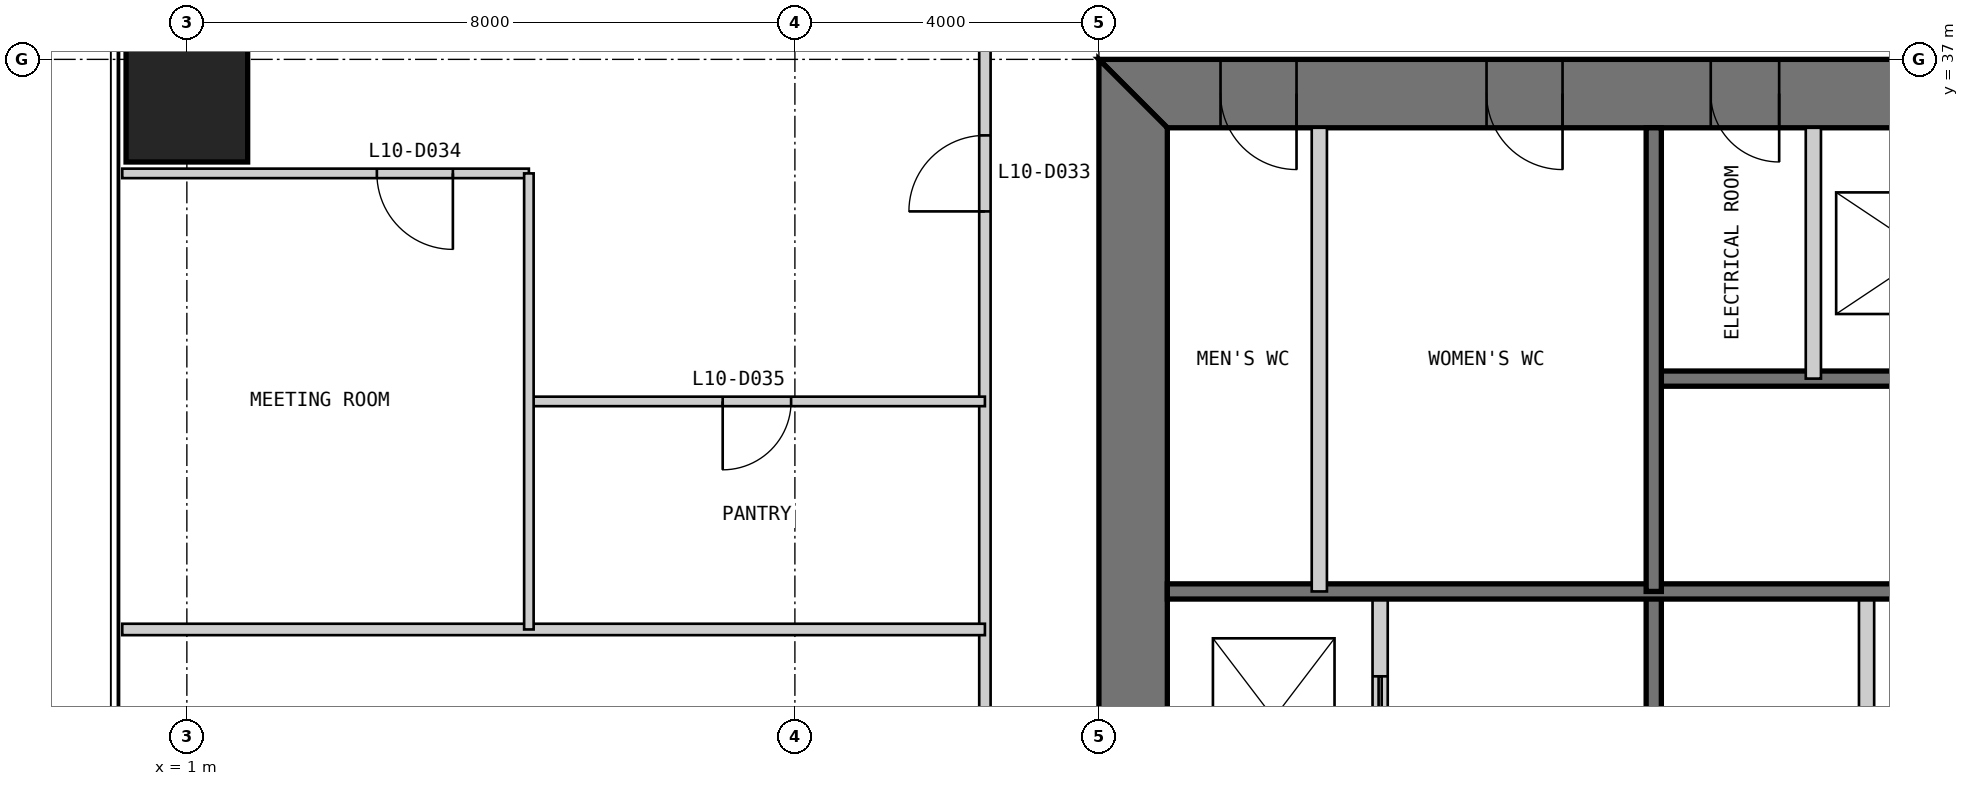
"""IFC4 building model, lengths in metres.
Left out: names, types, materials, properties, quantities, classifications, styles, units other than length and angle.
Written with IfcOpenShell. Run it as: python <this file> out.ifc"""

import sys

from ifc_helpers import new_model, si_unit, direction, frame, frame_2d, origin, origin_2d, place, context, subcontext, project, spatial, polyline, rectangle, outline, extrude, element, fill, save


model = new_model("IFC4")
c1 = context("Model", 3, precision=1e-05, world=origin(), true_north=direction((0.0, 1.0)))
c2 = subcontext(c1, "Body", "Model", "MODEL_VIEW")
j1 = project(units=[si_unit("LENGTHUNIT", "METRE"), si_unit("PLANEANGLEUNIT", "RADIAN")], contexts=[c1])
p1 = place(None, origin())
s1 = spatial("IfcSite", under=j1, at=p1, CompositionType="ELEMENT")
p2 = place(p1, origin())
s2 = spatial("IfcBuilding", under=s1, at=p2, CompositionType="ELEMENT")
p3 = place(p2, frame((0.0, 0.0, 47.0)))
s3 = spatial("IfcBuildingStorey", under=s2, at=p3, CompositionType="ELEMENT", Elevation=47.0)
p4 = place(p3, frame((1.0, 37.0, 0.0), z_axis=(0.0, 0.0, 1.0), x_axis=(1.0, 0.0, 0.0)))
e1 = element("IfcColumn", 1, at=p4, inside=s3, PredefinedType="COLUMN", context=c2, shape_type="SweptSolid", body=[
    extrude(rectangle(XDim=1.6, YDim=2.7, at=origin_2d()), origin(), (0.0, 0.0, 1.0), 4.0),
])
p5 = place(p3, frame((37.0, 36.55, 0.0), z_axis=(0.0, 0.0, 1.0), x_axis=(-1.0, 0.0, 0.0)))
e2 = element("IfcWall", 2, at=p5, inside=s3, PredefinedType="SHEAR", context=c2, shape_type="SweptSolid", body=[
    extrude(outline(polyline([(0.0, -0.45), (24.0, -0.45), (23.1, 0.45), (0.9, 0.45), (0.0, -0.45)])), origin(), (0.0, 0.0, 1.0), 4.0),
])
p6 = place(p5, frame((4.9, 0.0, 0.0)))
e3 = element("IfcOpeningElement", 3, at=p6, cuts=e2, PredefinedType="OPENING", context=c2, shape_type="SweptSolid", body=[
    extrude(rectangle(XDim=1.0, YDim=2.2, at=frame_2d((0.5, 1.1))), frame((0.0, 0.46, 0.0), z_axis=(0.0, -1.0, 0.0), x_axis=(1.0, 0.0, 0.0)), (0.0, 0.0, 1.0), 0.92),
])
p7 = place(p5, frame((8.9, 0.0, 0.0)))
e4 = element("IfcOpeningElement", 4, at=p7, cuts=e2, PredefinedType="OPENING", context=c2, shape_type="SweptSolid", body=[
    extrude(rectangle(XDim=1.1, YDim=2.2, at=frame_2d((0.55, 1.1))), frame((0.0, 0.46, 0.0), z_axis=(0.0, -1.0, 0.0), x_axis=(1.0, 0.0, 0.0)), (0.0, 0.0, 1.0), 0.92),
])
p8 = place(p5, frame((15.05, 0.0, 0.0)))
e5 = element("IfcOpeningElement", 5, at=p8, cuts=e2, PredefinedType="OPENING", context=c2, shape_type="SweptSolid", body=[
    extrude(rectangle(XDim=0.9, YDim=2.2, at=frame_2d((0.45, 1.1))), frame((0.0, 0.46, 0.0), z_axis=(0.0, -1.0, 0.0), x_axis=(1.0, 0.0, 0.0)), (0.0, 0.0, 1.0), 0.92),
])
p9 = place(p5, frame((17.9, 0.0, 0.0)))
e6 = element("IfcOpeningElement", 6, at=p9, cuts=e2, PredefinedType="OPENING", context=c2, shape_type="SweptSolid", body=[
    extrude(rectangle(XDim=1.0, YDim=2.2, at=frame_2d((0.5, 1.1))), frame((0.0, 0.46, 0.0), z_axis=(0.0, -1.0, 0.0), x_axis=(1.0, 0.0, 0.0)), (0.0, 0.0, 1.0), 0.92),
])
p10 = place(p5, frame((21.4, 0.0, 0.0)))
e7 = element("IfcOpeningElement", 7, at=p10, cuts=e2, PredefinedType="OPENING", context=c2, shape_type="SweptSolid", body=[
    extrude(rectangle(XDim=1.0, YDim=2.2, at=frame_2d((0.5, 1.1))), frame((0.0, 0.46, 0.0), z_axis=(0.0, -1.0, 0.0), x_axis=(1.0, 0.0, 0.0)), (0.0, 0.0, 1.0), 0.92),
])
p11 = place(p3, frame((13.45, 36.1, 0.0), z_axis=(0.0, 0.0, 1.0), x_axis=(0.0, -1.0, 0.0)))
e8 = element("IfcWall", 8, at=p11, inside=s3, PredefinedType="SHEAR", context=c2, shape_type="SweptSolid", body=[
    extrude(outline(polyline([(-0.9, -0.45), (23.1, -0.45), (22.2, 0.45), (0.0, 0.45), (-0.9, -0.45)])), origin(), (0.0, 0.0, 1.0), 4.0),
])
p12 = place(p11, frame((20.2, 0.0, 0.0)))
e9 = element("IfcOpeningElement", 9, at=p12, cuts=e8, PredefinedType="OPENING", context=c2, shape_type="SweptSolid", body=[
    extrude(rectangle(XDim=1.0, YDim=2.2, at=frame_2d((0.5, 1.1))), frame((0.0, 0.46, 0.0), z_axis=(0.0, -1.0, 0.0), x_axis=(1.0, 0.0, 0.0)), (0.0, 0.0, 1.0), 0.92),
])
p13 = place(p11, frame((17.25, 0.0, 0.0)))
e10 = element("IfcOpeningElement", 10, at=p13, cuts=e8, PredefinedType="OPENING", context=c2, shape_type="SweptSolid", body=[
    extrude(rectangle(XDim=0.9, YDim=2.2, at=frame_2d((0.45, 1.1))), frame((0.0, 0.46, 0.0), z_axis=(0.0, -1.0, 0.0), x_axis=(1.0, 0.0, 0.0)), (0.0, 0.0, 1.0), 0.92),
])
p14 = place(p3, frame((16.7, 13.9, 0.0), z_axis=(0.0, 0.0, 1.0), x_axis=(0.0, 1.0, 0.0)))
e11 = element("IfcWall", 11, at=p14, inside=s3, PredefinedType="PARTITIONING", context=c2, shape_type="SweptSolid", body=[
    extrude(rectangle(XDim=16.1, YDim=0.2, at=frame_2d((8.05, 0.0))), origin(), (0.0, 0.0, 1.0), 3.8),
])
p15 = place(p14, frame((4.4, 0.0, 0.0)))
e12 = element("IfcOpeningElement", 12, at=p15, cuts=e11, PredefinedType="OPENING", context=c2, shape_type="SweptSolid", body=[
    extrude(rectangle(XDim=0.9, YDim=2.2, at=frame_2d((0.45, 1.1))), frame((0.0, 0.11, 0.0), z_axis=(0.0, -1.0, 0.0), x_axis=(1.0, 0.0, 0.0)), (0.0, 0.0, 1.0), 0.22),
])
p16 = place(p14, frame((7.217, 0.0, 0.0)))
e13 = element("IfcOpeningElement", 13, at=p16, cuts=e11, PredefinedType="OPENING", context=c2, shape_type="SweptSolid", body=[
    extrude(rectangle(XDim=1.1, YDim=2.2, at=frame_2d((0.55, 1.1))), frame((0.0, 0.11, 0.0), z_axis=(0.0, -1.0, 0.0), x_axis=(1.0, 0.0, 0.0)), (0.0, 0.0, 1.0), 0.22),
])
p17 = place(p14, frame((10.55, 0.0, 0.0)))
e14 = element("IfcOpeningElement", 14, at=p17, cuts=e11, PredefinedType="OPENING", context=c2, shape_type="SweptSolid", body=[
    extrude(rectangle(XDim=1.1, YDim=2.2, at=frame_2d((0.55, 1.1))), frame((0.0, 0.11, 0.0), z_axis=(0.0, -1.0, 0.0), x_axis=(1.0, 0.0, 0.0)), (0.0, 0.0, 1.0), 0.22),
])
p18 = place(p14, frame((13.883, 0.0, 0.0)))
e15 = element("IfcOpeningElement", 15, at=p18, cuts=e11, PredefinedType="OPENING", context=c2, shape_type="SweptSolid", body=[
    extrude(rectangle(XDim=1.1, YDim=2.2, at=frame_2d((0.55, 1.1))), frame((0.0, 0.11, 0.0), z_axis=(0.0, -1.0, 0.0), x_axis=(1.0, 0.0, 0.0)), (0.0, 0.0, 1.0), 0.22),
])
p19 = place(p3, frame((20.3, 13.9, 0.0), z_axis=(0.0, 0.0, 1.0), x_axis=(0.0, 1.0, 0.0)))
e16 = element("IfcWall", 16, at=p19, inside=s3, PredefinedType="SOLIDWALL", context=c2, shape_type="SweptSolid", body=[
    extrude(rectangle(XDim=16.1, YDim=0.2, at=frame_2d((8.05, 0.0))), origin(), (0.0, 0.0, 1.0), 3.8),
])
p20 = place(p3, frame((23.1, 20.0, 0.0), z_axis=(0.0, 0.0, 1.0), x_axis=(0.0, 1.0, 0.0)))
e17 = element("IfcWall", 17, at=p20, inside=s3, PredefinedType="PARTITIONING", context=c2, shape_type="SweptSolid", body=[
    extrude(rectangle(XDim=10.0, YDim=0.2, at=frame_2d((5.0, 0.0))), origin(), (0.0, 0.0, 1.0), 3.8),
])
p21 = place(p3, frame((29.7, 32.8, 0.0), z_axis=(0.0, 0.0, 1.0), x_axis=(-1.0, 0.0, 0.0)))
e18 = element("IfcWall", 18, at=p21, inside=s3, PredefinedType="SOLIDWALL", context=c2, shape_type="SweptSolid", body=[
    extrude(rectangle(XDim=9.4, YDim=0.2, at=frame_2d((4.7, 0.0))), origin(), (0.0, 0.0, 1.0), 3.8),
])
p22 = place(p21, frame((0.25, 0.0, 0.0)))
e19 = element("IfcOpeningElement", 19, at=p22, cuts=e18, PredefinedType="OPENING", context=c2, shape_type="SweptSolid", body=[
    extrude(rectangle(XDim=1.0, YDim=2.2, at=frame_2d((0.5, 1.1))), frame((0.0, 0.11, 0.0), z_axis=(0.0, -1.0, 0.0), x_axis=(1.0, 0.0, 0.0)), (0.0, 0.0, 1.0), 0.22),
])
p23 = place(p3, frame((29.7, 30.0, 0.0), z_axis=(0.0, 0.0, 1.0), x_axis=(-1.0, 0.0, 0.0)))
e20 = element("IfcWall", 20, at=p23, inside=s3, PredefinedType="SOLIDWALL", context=c2, shape_type="SweptSolid", body=[
    extrude(rectangle(XDim=15.8, YDim=0.2, at=frame_2d((7.9, 0.0))), origin(), (0.0, 0.0, 1.0), 3.8),
])
p24 = place(p3, frame((22.4, 36.1, 0.0), z_axis=(0.0, 0.0, 1.0), x_axis=(0.0, -1.0, 0.0)))
e21 = element("IfcWall", 21, at=p24, inside=s3, PredefinedType="PARTITIONING", context=c2, shape_type="SweptSolid", body=[
    extrude(rectangle(XDim=3.3, YDim=0.2, at=frame_2d((1.65, 0.0))), origin(), (0.0, 0.0, 1.0), 3.8),
])
p25 = place(p3, frame((20.3, 36.1, 0.0), z_axis=(0.0, 0.0, 1.0), x_axis=(0.0, -1.0, 0.0)))
e22 = element("IfcWall", 22, at=p25, inside=s3, PredefinedType="SOLIDWALL", context=c2, shape_type="SweptSolid", body=[
    extrude(rectangle(XDim=6.1, YDim=0.2, at=frame_2d((3.05, 0.0))), origin(), (0.0, 0.0, 1.0), 3.8),
])
p26 = place(p3, frame((15.9, 36.1, 0.0), z_axis=(0.0, 0.0, 1.0), x_axis=(0.0, -1.0, 0.0)))
e23 = element("IfcWall", 23, at=p26, inside=s3, PredefinedType="PARTITIONING", context=c2, shape_type="SweptSolid", body=[
    extrude(rectangle(XDim=6.1, YDim=0.2, at=frame_2d((3.05, 0.0))), origin(), (0.0, 0.0, 1.0), 3.8),
])
p27 = place(p3, frame((11.5, 38.5, 0.0), z_axis=(0.0, 0.0, 1.0), x_axis=(0.0, -1.0, 0.0)))
e24 = element("IfcWall", 24, at=p27, inside=s3, PredefinedType="PARTITIONING", context=c2, shape_type="SweptSolid", body=[
    extrude(rectangle(XDim=27.0, YDim=0.15, at=frame_2d((13.5, 0.0))), origin(), (0.0, 0.0, 1.0), 3.85),
])
p28 = place(p27, frame((2.5, 0.0, 0.0)))
e25 = element("IfcOpeningElement", 25, at=p28, cuts=e24, PredefinedType="OPENING", context=c2, shape_type="SweptSolid", body=[
    extrude(rectangle(XDim=1.0, YDim=2.2, at=frame_2d((0.5, 1.1))), frame((0.0, 0.085, 0.0), z_axis=(0.0, -1.0, 0.0), x_axis=(1.0, 0.0, 0.0)), (0.0, 0.0, 1.0), 0.17),
])
p29 = place(p27, frame((13.0, 0.0, 0.0)))
e26 = element("IfcOpeningElement", 26, at=p29, cuts=e24, PredefinedType="OPENING", context=c2, shape_type="SweptSolid", body=[
    extrude(rectangle(XDim=1.0, YDim=2.2, at=frame_2d((0.5, 1.1))), frame((0.0, 0.085, 0.0), z_axis=(0.0, -1.0, 0.0), x_axis=(1.0, 0.0, 0.0)), (0.0, 0.0, 1.0), 0.17),
])
p30 = place(p27, frame((23.5, 0.0, 0.0)))
e27 = element("IfcOpeningElement", 27, at=p30, cuts=e24, PredefinedType="OPENING", context=c2, shape_type="SweptSolid", body=[
    extrude(rectangle(XDim=1.0, YDim=2.2, at=frame_2d((0.5, 1.1))), frame((0.0, 0.085, 0.0), z_axis=(0.0, -1.0, 0.0), x_axis=(1.0, 0.0, 0.0)), (0.0, 0.0, 1.0), 0.17),
])
p31 = place(p3, frame((0.15, 35.5, 0.0), z_axis=(0.0, 0.0, 1.0), x_axis=(1.0, 0.0, 0.0)))
e28 = element("IfcWall", 28, at=p31, inside=s3, PredefinedType="PARTITIONING", context=c2, shape_type="SweptSolid", body=[
    extrude(rectangle(XDim=5.35, YDim=0.125, at=frame_2d((2.675, 0.0))), origin(), (0.0, 0.0, 1.0), 3.85),
])
p32 = place(p31, frame((3.35, 0.0, 0.0)))
e29 = element("IfcOpeningElement", 29, at=p32, cuts=e28, PredefinedType="OPENING", context=c2, shape_type="SweptSolid", body=[
    extrude(rectangle(XDim=1.0, YDim=2.2, at=frame_2d((0.5, 1.1))), frame((0.0, 0.073, 0.0), z_axis=(0.0, -1.0, 0.0), x_axis=(1.0, 0.0, 0.0)), (0.0, 0.0, 1.0), 0.145),
])
p33 = place(p3, frame((5.5, 32.5, 0.0), z_axis=(0.0, 0.0, 1.0), x_axis=(1.0, 0.0, 0.0)))
e30 = element("IfcWall", 30, at=p33, inside=s3, PredefinedType="PARTITIONING", context=c2, shape_type="SweptSolid", body=[
    extrude(rectangle(XDim=6.0, YDim=0.125, at=frame_2d((3.0, 0.0))), origin(), (0.0, 0.0, 1.0), 3.85),
])
p34 = place(p33, frame((2.55, 0.0, 0.0)))
e31 = element("IfcOpeningElement", 31, at=p34, cuts=e30, PredefinedType="OPENING", context=c2, shape_type="SweptSolid", body=[
    extrude(rectangle(XDim=0.9, YDim=2.2, at=frame_2d((0.45, 1.1))), frame((0.0, 0.073, 0.0), z_axis=(0.0, -1.0, 0.0), x_axis=(1.0, 0.0, 0.0)), (0.0, 0.0, 1.0), 0.145),
])
p35 = place(p3, frame((0.15, 29.5, 0.0), z_axis=(0.0, 0.0, 1.0), x_axis=(1.0, 0.0, 0.0)))
e32 = element("IfcWall", 32, at=p35, inside=s3, PredefinedType="PARTITIONING", context=c2, shape_type="SweptSolid", body=[
    extrude(rectangle(XDim=11.35, YDim=0.15, at=frame_2d((5.675, 0.0))), origin(), (0.0, 0.0, 1.0), 3.85),
])
p36 = place(p3, frame((5.5, 35.5, 0.0), z_axis=(0.0, 0.0, 1.0), x_axis=(0.0, -1.0, 0.0)))
e33 = element("IfcWall", 33, at=p36, inside=s3, PredefinedType="PARTITIONING", context=c2, shape_type="SweptSolid", body=[
    extrude(rectangle(XDim=6.0, YDim=0.125, at=frame_2d((3.0, 0.0))), origin(), (0.0, 0.0, 1.0), 3.85),
])
p37 = place(p8, origin())
e34 = element("IfcDoor", 34, at=p37, inside=s3, OperationType="SINGLE_SWING_LEFT", PredefinedType="DOOR", context=c2, shape_type="SweptSolid", body=[
    extrude(rectangle(XDim=0.9, YDim=2.2, at=frame_2d((0.45, 1.1))), frame((0.0, 0.025, 0.0), z_axis=(0.0, -1.0, 0.0), x_axis=(1.0, 0.0, 0.0)), (0.0, 0.0, 1.0), 0.05),
    extrude(outline(polyline([(0.0, 0.0), (0.04, 0.0), (0.04, 2.16), (0.86, 2.16), (0.86, 0.0), (0.9, 0.0), (0.9, 2.2), (0.0, 2.2), (0.0, 0.0)])), frame((0.0, 0.3, 0.0), z_axis=(0.0, -1.0, 0.0), x_axis=(1.0, 0.0, 0.0)), (0.0, 0.0, 1.0), 0.6),
])
fill(e5, e34)
p38 = place(p9, origin())
e35 = element("IfcDoor", 35, at=p38, inside=s3, OperationType="SINGLE_SWING_LEFT", PredefinedType="DOOR", context=c2, shape_type="SweptSolid", body=[
    extrude(rectangle(XDim=1.0, YDim=2.2, at=frame_2d((0.5, 1.1))), frame((0.0, 0.025, 0.0), z_axis=(0.0, -1.0, 0.0), x_axis=(1.0, 0.0, 0.0)), (0.0, 0.0, 1.0), 0.05),
    extrude(outline(polyline([(0.0, 0.0), (0.04, 0.0), (0.04, 2.16), (0.96, 2.16), (0.96, 0.0), (1.0, 0.0), (1.0, 2.2), (0.0, 2.2), (0.0, 0.0)])), frame((0.0, 0.3, 0.0), z_axis=(0.0, -1.0, 0.0), x_axis=(1.0, 0.0, 0.0)), (0.0, 0.0, 1.0), 0.6),
])
fill(e6, e35)
p39 = place(p10, origin())
e36 = element("IfcDoor", 36, at=p39, inside=s3, OperationType="SINGLE_SWING_LEFT", PredefinedType="DOOR", context=c2, shape_type="SweptSolid", body=[
    extrude(rectangle(XDim=1.0, YDim=2.2, at=frame_2d((0.5, 1.1))), frame((0.0, 0.025, 0.0), z_axis=(0.0, -1.0, 0.0), x_axis=(1.0, 0.0, 0.0)), (0.0, 0.0, 1.0), 0.05),
    extrude(outline(polyline([(0.0, 0.0), (0.04, 0.0), (0.04, 2.16), (0.96, 2.16), (0.96, 0.0), (1.0, 0.0), (1.0, 2.2), (0.0, 2.2), (0.0, 0.0)])), frame((0.0, 0.3, 0.0), z_axis=(0.0, -1.0, 0.0), x_axis=(1.0, 0.0, 0.0)), (0.0, 0.0, 1.0), 0.6),
])
fill(e7, e36)
p40 = place(p28, frame((1.0, 0.0, 0.0), z_axis=(0.0, 0.0, 1.0), x_axis=(-1.0, 0.0, 0.0)))
e37 = element("IfcDoor", 37, at=p40, inside=s3, OperationType="SINGLE_SWING_LEFT", PredefinedType="DOOR", context=c2, shape_type="SweptSolid", body=[
    extrude(rectangle(XDim=1.0, YDim=2.2, at=frame_2d((0.5, 1.1))), frame((0.0, 0.025, 0.0), z_axis=(0.0, -1.0, 0.0), x_axis=(1.0, 0.0, 0.0)), (0.0, 0.0, 1.0), 0.05),
])
fill(e25, e37)
p41 = place(p32, frame((1.0, 0.0, 0.0), z_axis=(0.0, 0.0, 1.0), x_axis=(-1.0, 0.0, 0.0)))
e38 = element("IfcDoor", 38, at=p41, inside=s3, OperationType="SINGLE_SWING_LEFT", PredefinedType="DOOR", context=c2, shape_type="SweptSolid", body=[
    extrude(rectangle(XDim=1.0, YDim=2.2, at=frame_2d((0.5, 1.1))), frame((0.0, 0.025, 0.0), z_axis=(0.0, -1.0, 0.0), x_axis=(1.0, 0.0, 0.0)), (0.0, 0.0, 1.0), 0.05),
])
fill(e29, e38)
p42 = place(p34, frame((0.9, 0.0, 0.0), z_axis=(0.0, 0.0, 1.0), x_axis=(-1.0, 0.0, 0.0)))
e39 = element("IfcDoor", 39, at=p42, inside=s3, OperationType="SINGLE_SWING_RIGHT", PredefinedType="DOOR", context=c2, shape_type="SweptSolid", body=[
    extrude(rectangle(XDim=0.9, YDim=2.2, at=frame_2d((0.45, 1.1))), frame((0.0, 0.025, 0.0), z_axis=(0.0, -1.0, 0.0), x_axis=(1.0, 0.0, 0.0)), (0.0, 0.0, 1.0), 0.05),
])
fill(e31, e39)
p43 = place(p18, origin())
e40 = element("IfcDoor", 40, at=p43, inside=s3, OperationType="DOUBLE_DOOR_SLIDING", PredefinedType="DOOR", context=c2, shape_type="SweptSolid", body=[
    extrude(rectangle(XDim=1.1, YDim=2.2, at=frame_2d((0.55, 1.1))), frame((0.0, 0.025, 0.0), z_axis=(0.0, -1.0, 0.0), x_axis=(1.0, 0.0, 0.0)), (0.0, 0.0, 1.0), 0.05),
])
fill(e15, e40)
save(model, sys.argv[1])
